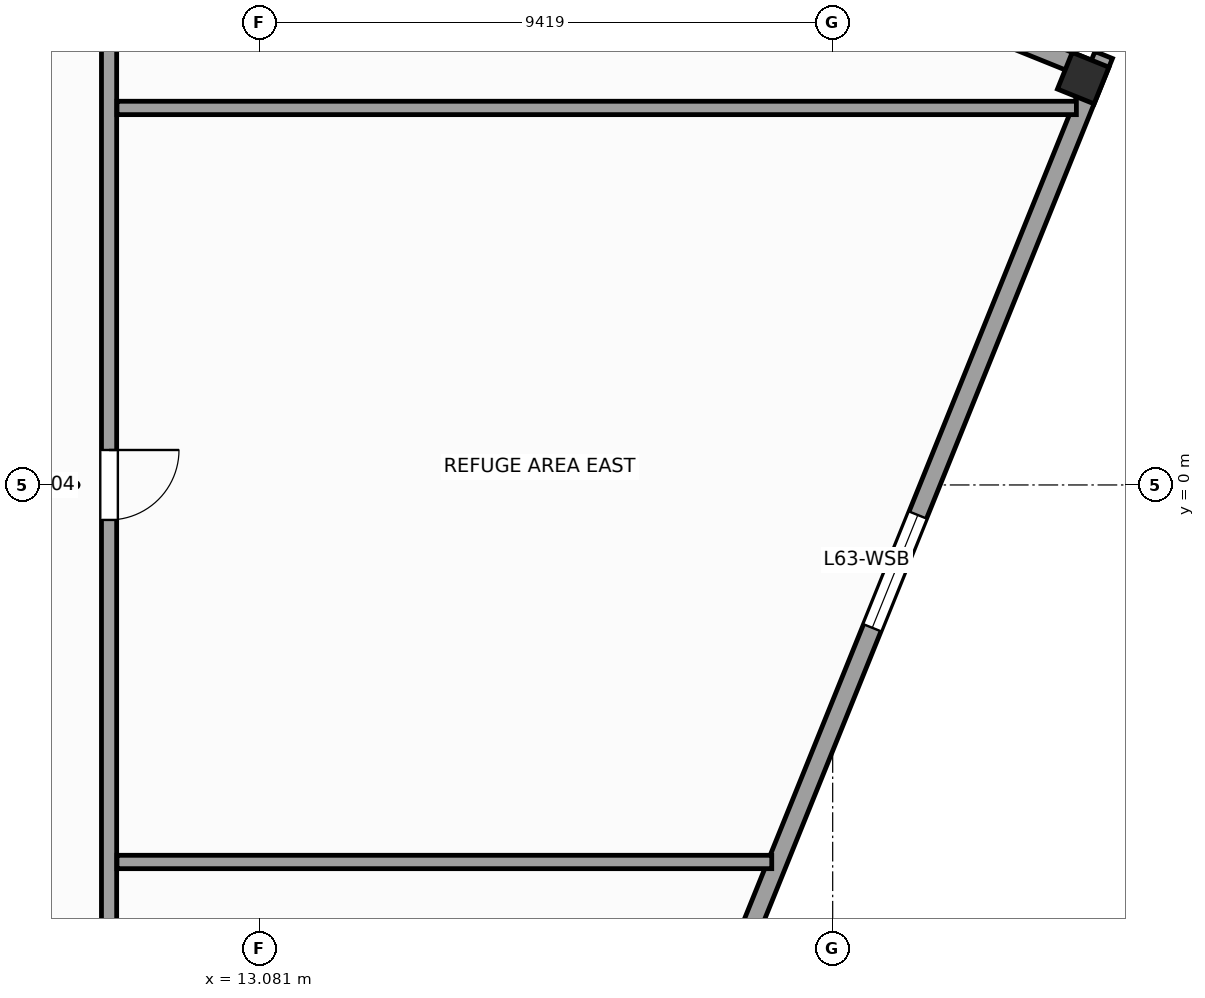
"""IFC4 building model, lengths in metres.
Left out: names, types, materials, properties, quantities, classifications, styles, units other than length and angle.
Written with IfcOpenShell. Run it as: python <this file> out.ifc"""

import sys

from ifc_helpers import new_model, si_unit, direction, frame, frame_2d, origin, origin_2d, place, context, subcontext, project, spatial, rectangle, extrude, source, transform, mapped, element, fill, save


model = new_model("IFC4")
c1 = context("Model", 3, precision=1e-05, world=origin(), true_north=direction((0.0, 1.0)))
c2 = subcontext(c1, "Body", "Model", "MODEL_VIEW")
j1 = project(units=[si_unit("LENGTHUNIT", "METRE"), si_unit("PLANEANGLEUNIT", "RADIAN")], contexts=[c1])
p1 = place(None, origin())
s1 = spatial("IfcSite", under=j1, at=p1, CompositionType="ELEMENT")
p2 = place(p1, origin())
s2 = spatial("IfcBuilding", under=s1, at=p2, CompositionType="ELEMENT")
p3 = place(p2, frame((0.0, 0.0, 260.2)))
s3 = spatial("IfcBuildingStorey", under=s2, at=p3, CompositionType="ELEMENT", Elevation=260.2)
m1 = source(origin(), c2, "Body", "SweptSolid", [
    extrude(rectangle(XDim=0.65, YDim=0.65, at=origin_2d()), origin(), (0.0, 0.0, 1.0), 5.0),
])
p4 = place(p3, frame((26.62, 6.69, 0.0), z_axis=(0.0, 0.0, 1.0), x_axis=(0.374606593416, 0.927183854567, 0.0)))
e1 = element("IfcColumn", 1, at=p4, inside=s3, PredefinedType="COLUMN", context=c2, shape_type="MappedRepresentation", body=[
    mapped(m1, transform((0.0, 0.0, 0.0), scale=1.0)),
])
p5 = place(p3, frame((26.841, 6.784, 0.0), z_axis=(0.0, 0.0, 1.0), x_axis=(-0.927171722085, 0.374636620962, 0.0)))
e2 = element("IfcWall", 2, at=p5, inside=s3, PredefinedType="STANDARD", context=c2, shape_type="SweptSolid", body=[
    extrude(rectangle(XDim=6.0, YDim=0.31, at=frame_2d((3.0, 0.0))), origin(), (0.0, 0.0, 1.0), 4.05),
])
p6 = place(p3, frame((20.718, -8.371, 0.0), z_axis=(0.0, 0.0, 1.0), x_axis=(0.374600710538, 0.927186231382, 0.0)))
e3 = element("IfcWall", 3, at=p6, inside=s3, PredefinedType="STANDARD", context=c2, shape_type="SweptSolid", body=[
    extrude(rectangle(XDim=16.655, YDim=0.31, at=frame_2d((8.328, 0.0))), origin(), (0.0, 0.0, 1.0), 4.15),
])
p7 = place(p6, frame((6.495, 0.0, 0.65)))
e4 = element("IfcOpeningElement", 4, at=p7, cuts=e3, PredefinedType="OPENING", context=c2, shape_type="SweptSolid", body=[
    extrude(rectangle(XDim=2.0, YDim=1.45, at=frame_2d((1.0, 0.725))), frame((0.0, 0.165, 0.0), z_axis=(0.0, -1.0, 0.0), x_axis=(1.0, 0.0, 0.0)), (0.0, 0.0, 1.0), 0.33),
])
p8 = place(p3, frame((10.6, -11.9, 0.0), z_axis=(0.0, 0.0, 1.0), x_axis=(0.0, 1.0, 0.0)))
e5 = element("IfcWall", 5, at=p8, inside=s3, PredefinedType="PARTITIONING", context=c2, shape_type="SweptSolid", body=[
    extrude(rectangle(XDim=23.8, YDim=0.25, at=frame_2d((11.9, 0.0))), origin(), (0.0, 0.0, 1.0), 4.75),
])
p9 = place(p8, frame((20.21, 0.0, 0.0)))
e6 = element("IfcOpeningElement", 6, at=p9, cuts=e5, PredefinedType="OPENING", context=c2, shape_type="SweptSolid", body=[
    extrude(rectangle(XDim=1.15, YDim=2.25, at=frame_2d((0.575, 1.125))), frame((0.0, 0.135, 0.0), z_axis=(0.0, -1.0, 0.0), x_axis=(1.0, 0.0, 0.0)), (0.0, 0.0, 1.0), 0.27),
])
p10 = place(p8, frame((11.325, 0.0, 0.0)))
e7 = element("IfcOpeningElement", 7, at=p10, cuts=e5, PredefinedType="OPENING", context=c2, shape_type="SweptSolid", body=[
    extrude(rectangle(XDim=1.15, YDim=2.25, at=frame_2d((0.575, 1.125))), frame((0.0, 0.135, 0.0), z_axis=(0.0, -1.0, 0.0), x_axis=(1.0, 0.0, 0.0)), (0.0, 0.0, 1.0), 0.27),
])
p11 = place(p3, frame((10.73, 6.2, 0.0), z_axis=(0.0, 0.0, 1.0), x_axis=(1.0, 0.0, 0.0)))
e8 = element("IfcWall", 8, at=p11, inside=s3, PredefinedType="PARTITIONING", context=c2, shape_type="SweptSolid", body=[
    extrude(rectangle(XDim=15.778, YDim=0.22, at=frame_2d((7.889, 0.0))), origin(), (0.0, 0.0, 1.0), 4.75),
])
p12 = place(p3, frame((10.73, -6.2, 0.0), z_axis=(0.0, 0.0, 1.0), x_axis=(1.0, 0.0, 0.0)))
e9 = element("IfcWall", 9, at=p12, inside=s3, PredefinedType="PARTITIONING", context=c2, shape_type="SweptSolid", body=[
    extrude(rectangle(XDim=10.768, YDim=0.22, at=frame_2d((5.384, 0.0))), origin(), (0.0, 0.0, 1.0), 4.75),
])
m2 = source(origin(), c2, "Body", "SweptSolid", [
    extrude(rectangle(XDim=2.0, YDim=1.45, at=frame_2d((1.0, 0.725))), frame((0.0, 0.03, 0.0), z_axis=(0.0, -1.0, 0.0), x_axis=(1.0, 0.0, 0.0)), (0.0, 0.0, 1.0), 0.06),
])
p13 = place(p7, origin())
e10 = element("IfcWindow", 10, at=p13, inside=s3, PartitioningType="SINGLE_PANEL", PredefinedType="WINDOW", context=c2, shape_type="MappedRepresentation", body=[
    mapped(m2, transform((0.0, 0.0, 0.0), scale=1.0)),
])
fill(e4, e10)
m3 = source(origin(), c2, "Body", "SweptSolid", [
    extrude(rectangle(XDim=1.15, YDim=2.25, at=frame_2d((0.575, 1.125))), frame((0.0, 0.025, 0.0), z_axis=(0.0, -1.0, 0.0), x_axis=(1.0, 0.0, 0.0)), (0.0, 0.0, 1.0), 0.05),
])
p14 = place(p10, frame((1.15, 0.0, 0.0), z_axis=(0.0, 0.0, 1.0), x_axis=(-1.0, 0.0, 0.0)))
e11 = element("IfcDoor", 11, at=p14, inside=s3, OperationType="SINGLE_SWING_RIGHT", PredefinedType="DOOR", context=c2, shape_type="MappedRepresentation", body=[
    mapped(m3, transform((0.0, 0.0, 0.0), scale=1.0)),
])
fill(e7, e11)
save(model, sys.argv[1])
